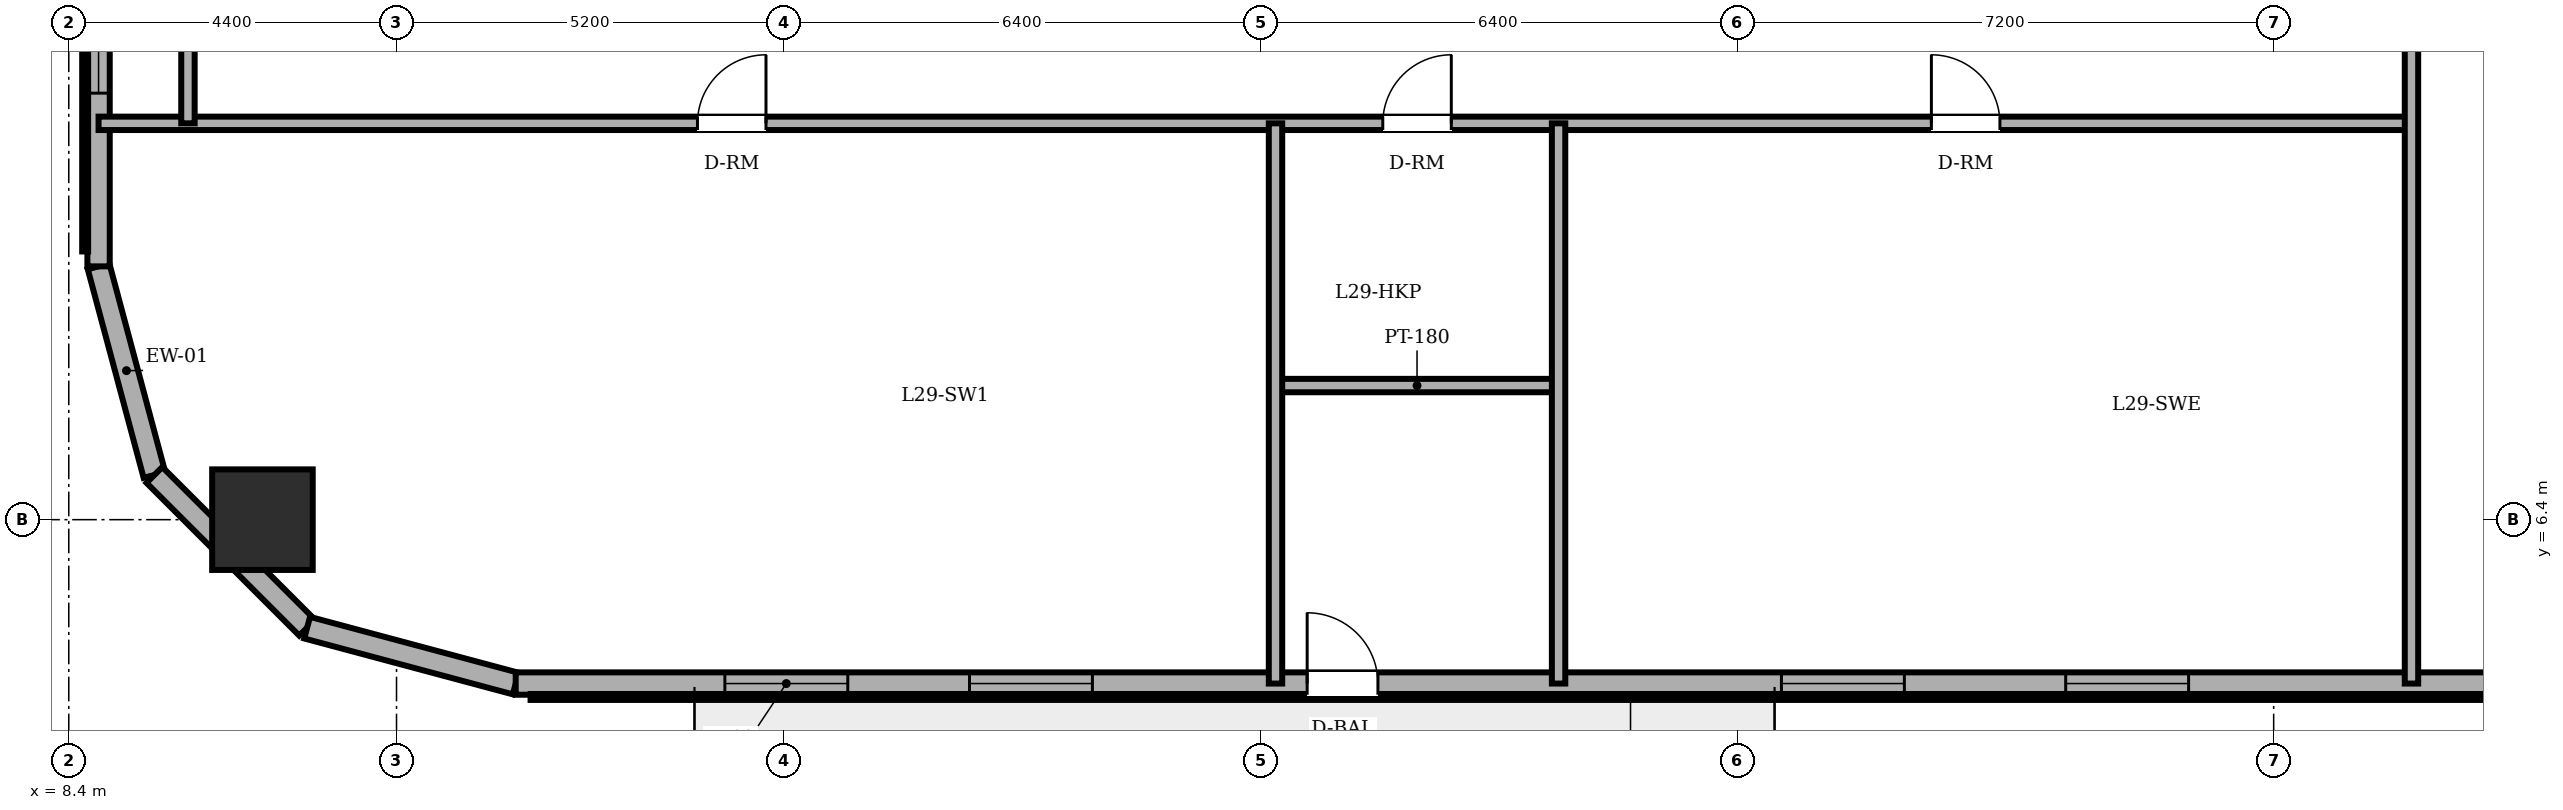
"""IFC4 building model, lengths in metres.
Left out: names, types, materials, properties, quantities, classifications, styles, units other than length and angle.
Written with IfcOpenShell. Run it as: python <this file> out.ifc"""

import sys

from ifc_helpers import new_model, si_unit, direction, frame, frame_2d, origin, origin_2d, place, context, subcontext, project, spatial, rectangle, circle, extrude, element, fill, save


model = new_model("IFC4")
c1 = context("Model", 3, precision=1e-05, world=origin(), true_north=direction((0.0, 1.0)))
c2 = subcontext(c1, "Body", "Model", "MODEL_VIEW")
j1 = project(units=[si_unit("LENGTHUNIT", "METRE"), si_unit("PLANEANGLEUNIT", "RADIAN")], contexts=[c1])
p1 = place(None, origin())
s1 = spatial("IfcSite", under=j1, at=p1, CompositionType="ELEMENT")
p2 = place(p1, origin())
s2 = spatial("IfcBuilding", under=s1, at=p2, CompositionType="ELEMENT")
p3 = place(p2, frame((0.0, 0.0, 111.5)))
s3 = spatial("IfcBuildingStorey", under=s2, at=p3, CompositionType="ELEMENT", Elevation=111.5)
p4 = place(p3, frame((11.0, 6.4, 0.0), z_axis=(0.0, 0.0, 1.0), x_axis=(1.0, 0.0, 0.0)))
e1 = element("IfcColumn", 1, at=p4, inside=s3, PredefinedType="COLUMN", context=c2, shape_type="SweptSolid", body=[
    extrude(circle(Radius=0.675, at=origin_2d()), origin(), (0.0, 0.0, 1.0), 3.6),
])
p5 = place(p3, frame((8.8, 9.8, 0.0), z_axis=(0.0, 0.0, 1.0), x_axis=(0.258731875344, -0.96594917914, 0.0)))
e2 = element("IfcWall", 2, at=p5, inside=s3, PredefinedType="SOLIDWALL", context=c2, shape_type="SweptSolid", body=[
    extrude(rectangle(XDim=2.899, YDim=0.3, at=frame_2d((1.449, 0.0))), origin(), (0.0, 0.0, 1.0), 3.4),
])
p6 = place(p3, frame((9.55, 7.0, 0.0), z_axis=(0.0, 0.0, 1.0), x_axis=(0.707106781187, -0.707106781187, 0.0)))
e3 = element("IfcWall", 3, at=p6, inside=s3, PredefinedType="SOLIDWALL", context=c2, shape_type="SweptSolid", body=[
    extrude(rectangle(XDim=2.899, YDim=0.3, at=frame_2d((1.45, 0.0))), origin(), (0.0, 0.0, 1.0), 3.4),
])
p7 = place(p3, frame((11.6, 4.95, 0.0), z_axis=(0.0, 0.0, 1.0), x_axis=(0.965943540406, -0.258752926066, 0.0)))
e4 = element("IfcWall", 4, at=p7, inside=s3, PredefinedType="SOLIDWALL", context=c2, shape_type="SweptSolid", body=[
    extrude(rectangle(XDim=2.898, YDim=0.3, at=frame_2d((1.449, 0.0))), origin(), (0.0, 0.0, 1.0), 3.4),
])
p8 = place(p3, frame((14.4, 4.2, 0.0), z_axis=(0.0, 0.0, 1.0), x_axis=(1.0, 0.0, 0.0)))
e5 = element("IfcWall", 5, at=p8, inside=s3, PredefinedType="SOLIDWALL", context=c2, shape_type="SweptSolid", body=[
    extrude(rectangle(XDim=29.933, YDim=0.3, at=frame_2d((14.967, 0.0))), origin(), (0.0, 0.0, 1.0), 3.4),
])
p9 = place(p8, frame((10.625, 0.0, 0.0)))
e6 = element("IfcOpeningElement", 6, at=p9, cuts=e5, PredefinedType="OPENING", context=c2, shape_type="SweptSolid", body=[
    extrude(rectangle(XDim=0.95, YDim=2.2, at=frame_2d((0.475, 1.1))), frame((0.0, 0.16, 0.0), z_axis=(0.0, -1.0, 0.0), x_axis=(1.0, 0.0, 0.0)), (0.0, 0.0, 1.0), 0.32),
])
p10 = place(p8, frame((2.808, 0.0, 0.85)))
e7 = element("IfcOpeningElement", 7, at=p10, cuts=e5, PredefinedType="OPENING", context=c2, shape_type="SweptSolid", body=[
    extrude(rectangle(XDim=1.65, YDim=1.55, at=frame_2d((0.825, 0.775))), frame((0.0, 0.16, 0.0), z_axis=(0.0, -1.0, 0.0), x_axis=(1.0, 0.0, 0.0)), (0.0, 0.0, 1.0), 0.32),
])
p11 = place(p8, frame((6.092, 0.0, 0.85)))
e8 = element("IfcOpeningElement", 8, at=p11, cuts=e5, PredefinedType="OPENING", context=c2, shape_type="SweptSolid", body=[
    extrude(rectangle(XDim=1.65, YDim=1.55, at=frame_2d((0.825, 0.775))), frame((0.0, 0.16, 0.0), z_axis=(0.0, -1.0, 0.0), x_axis=(1.0, 0.0, 0.0)), (0.0, 0.0, 1.0), 0.32),
])
p12 = place(p8, frame((16.992, 0.0, 0.85)))
e9 = element("IfcOpeningElement", 9, at=p12, cuts=e5, PredefinedType="OPENING", context=c2, shape_type="SweptSolid", body=[
    extrude(rectangle(XDim=1.65, YDim=1.55, at=frame_2d((0.825, 0.775))), frame((0.0, 0.16, 0.0), z_axis=(0.0, -1.0, 0.0), x_axis=(1.0, 0.0, 0.0)), (0.0, 0.0, 1.0), 0.32),
])
p13 = place(p8, frame((20.808, 0.0, 0.85)))
e10 = element("IfcOpeningElement", 10, at=p13, cuts=e5, PredefinedType="OPENING", context=c2, shape_type="SweptSolid", body=[
    extrude(rectangle(XDim=1.65, YDim=1.55, at=frame_2d((0.825, 0.775))), frame((0.0, 0.16, 0.0), z_axis=(0.0, -1.0, 0.0), x_axis=(1.0, 0.0, 0.0)), (0.0, 0.0, 1.0), 0.32),
])
p14 = place(p8, frame((26.692, 0.0, 0.85)))
e11 = element("IfcOpeningElement", 11, at=p14, cuts=e5, PredefinedType="OPENING", context=c2, shape_type="SweptSolid", body=[
    extrude(rectangle(XDim=1.65, YDim=1.55, at=frame_2d((0.825, 0.775))), frame((0.0, 0.16, 0.0), z_axis=(0.0, -1.0, 0.0), x_axis=(1.0, 0.0, 0.0)), (0.0, 0.0, 1.0), 0.32),
])
p15 = place(p3, frame((8.8, 38.2, 0.0), z_axis=(0.0, 0.0, 1.0), x_axis=(0.0, -1.0, 0.0)))
e12 = element("IfcWall", 12, at=p15, inside=s3, PredefinedType="SOLIDWALL", context=c2, shape_type="SweptSolid", body=[
    extrude(rectangle(XDim=28.4, YDim=0.3, at=frame_2d((14.2, 0.0))), origin(), (0.0, 0.0, 1.0), 3.4),
])
p16 = place(p15, frame((2.325, 0.0, 0.85)))
e13 = element("IfcOpeningElement", 13, at=p16, cuts=e12, PredefinedType="OPENING", context=c2, shape_type="SweptSolid", body=[
    extrude(rectangle(XDim=1.65, YDim=1.55, at=frame_2d((0.825, 0.775))), frame((0.0, 0.16, 0.0), z_axis=(0.0, -1.0, 0.0), x_axis=(1.0, 0.0, 0.0)), (0.0, 0.0, 1.0), 0.32),
])
p17 = place(p15, frame((6.828, 0.0, 0.85)))
e14 = element("IfcOpeningElement", 14, at=p17, cuts=e12, PredefinedType="OPENING", context=c2, shape_type="SweptSolid", body=[
    extrude(rectangle(XDim=1.65, YDim=1.55, at=frame_2d((0.825, 0.775))), frame((0.0, 0.16, 0.0), z_axis=(0.0, -1.0, 0.0), x_axis=(1.0, 0.0, 0.0)), (0.0, 0.0, 1.0), 0.32),
])
p18 = place(p15, frame((10.102, 0.0, 0.85)))
e15 = element("IfcOpeningElement", 15, at=p18, cuts=e12, PredefinedType="OPENING", context=c2, shape_type="SweptSolid", body=[
    extrude(rectangle(XDim=1.65, YDim=1.55, at=frame_2d((0.825, 0.775))), frame((0.0, 0.16, 0.0), z_axis=(0.0, -1.0, 0.0), x_axis=(1.0, 0.0, 0.0)), (0.0, 0.0, 1.0), 0.32),
])
p19 = place(p15, frame((16.648, 0.0, 0.85)))
e16 = element("IfcOpeningElement", 16, at=p19, cuts=e12, PredefinedType="OPENING", context=c2, shape_type="SweptSolid", body=[
    extrude(rectangle(XDim=1.65, YDim=1.55, at=frame_2d((0.825, 0.775))), frame((0.0, 0.16, 0.0), z_axis=(0.0, -1.0, 0.0), x_axis=(1.0, 0.0, 0.0)), (0.0, 0.0, 1.0), 0.32),
])
p20 = place(p15, frame((19.922, 0.0, 0.85)))
e17 = element("IfcOpeningElement", 17, at=p20, cuts=e12, PredefinedType="OPENING", context=c2, shape_type="SweptSolid", body=[
    extrude(rectangle(XDim=1.65, YDim=1.55, at=frame_2d((0.825, 0.775))), frame((0.0, 0.16, 0.0), z_axis=(0.0, -1.0, 0.0), x_axis=(1.0, 0.0, 0.0)), (0.0, 0.0, 1.0), 0.32),
])
p21 = place(p15, frame((24.425, 0.0, 0.85)))
e18 = element("IfcOpeningElement", 18, at=p21, cuts=e12, PredefinedType="OPENING", context=c2, shape_type="SweptSolid", body=[
    extrude(rectangle(XDim=1.65, YDim=1.55, at=frame_2d((0.825, 0.775))), frame((0.0, 0.16, 0.0), z_axis=(0.0, -1.0, 0.0), x_axis=(1.0, 0.0, 0.0)), (0.0, 0.0, 1.0), 0.32),
])
p22 = place(p3, frame((24.6, 8.2, 0.0), z_axis=(0.0, 0.0, 1.0), x_axis=(1.0, 0.0, 0.0)))
e19 = element("IfcWall", 19, at=p22, inside=s3, PredefinedType="PARTITIONING", context=c2, shape_type="SweptSolid", body=[
    extrude(rectangle(XDim=3.8, YDim=0.18, at=frame_2d((1.9, 0.0))), origin(), (0.0, 0.0, 1.0), 3.4),
])
p23 = place(p3, frame((8.8, 11.72, 0.0), z_axis=(0.0, 0.0, 1.0), x_axis=(1.0, 0.0, 0.0)))
e20 = element("IfcWall", 20, at=p23, inside=s3, PredefinedType="PARTITIONING", context=c2, shape_type="SweptSolid", body=[
    extrude(rectangle(XDim=31.05, YDim=0.18, at=frame_2d((15.525, 0.0))), origin(), (0.0, 0.0, 1.0), 3.4),
])
p24 = place(p23, frame((17.24, 0.0, 0.0)))
e21 = element("IfcOpeningElement", 21, at=p24, cuts=e20, PredefinedType="OPENING", context=c2, shape_type="SweptSolid", body=[
    extrude(rectangle(XDim=0.92, YDim=2.1, at=frame_2d((0.46, 1.05))), frame((0.0, 0.1, 0.0), z_axis=(0.0, -1.0, 0.0), x_axis=(1.0, 0.0, 0.0)), (0.0, 0.0, 1.0), 0.2),
])
p25 = place(p23, frame((8.04, 0.0, 0.0)))
e22 = element("IfcOpeningElement", 22, at=p25, cuts=e20, PredefinedType="OPENING", context=c2, shape_type="SweptSolid", body=[
    extrude(rectangle(XDim=0.92, YDim=2.1, at=frame_2d((0.46, 1.05))), frame((0.0, 0.1, 0.0), z_axis=(0.0, -1.0, 0.0), x_axis=(1.0, 0.0, 0.0)), (0.0, 0.0, 1.0), 0.2),
])
p26 = place(p23, frame((24.605, 0.0, 0.0)))
e23 = element("IfcOpeningElement", 23, at=p26, cuts=e20, PredefinedType="OPENING", context=c2, shape_type="SweptSolid", body=[
    extrude(rectangle(XDim=0.92, YDim=2.1, at=frame_2d((0.46, 1.05))), frame((0.0, 0.1, 0.0), z_axis=(0.0, -1.0, 0.0), x_axis=(1.0, 0.0, 0.0)), (0.0, 0.0, 1.0), 0.2),
])
p27 = place(p3, frame((10.0, 11.72, 0.0), z_axis=(0.0, 0.0, 1.0), x_axis=(0.0, 1.0, 0.0)))
e24 = element("IfcWall", 24, at=p27, inside=s3, PredefinedType="PARTITIONING", context=c2, shape_type="SweptSolid", body=[
    extrude(rectangle(XDim=2.46, YDim=0.18, at=frame_2d((1.23, 0.0))), origin(), (0.0, 0.0, 1.0), 3.4),
])
for number, where, z_axis, x_axis in (
    (25, (24.6, 4.2, 0.0), (0.0, 0.0, 1.0), (0.0, 1.0, 0.0)),
    (26, (28.4, 4.2, 0.0), (0.0, 0.0, 1.0), (0.0, 1.0, 0.0)),
):
    element("IfcWall", number, at=place(p3, frame(where, z_axis=z_axis, x_axis=x_axis)), inside=s3, PredefinedType="PARTITIONING", context=c2, shape_type="SweptSolid", body=[
        extrude(rectangle(XDim=7.52, YDim=0.18, at=frame_2d((3.76, 0.0))), origin(), (0.0, 0.0, 1.0), 3.4),
    ])
p28 = place(p3, frame((39.85, 4.2, 0.0), z_axis=(0.0, 0.0, 1.0), x_axis=(0.0, 1.0, 0.0)))
e27 = element("IfcWall", 27, at=p28, inside=s3, PredefinedType="PARTITIONING", context=c2, shape_type="SweptSolid", body=[
    extrude(rectangle(XDim=18.62, YDim=0.18, at=frame_2d((9.31, 0.0))), origin(), (0.0, 0.0, 1.0), 3.4),
])
p29 = place(p28, frame((12.35, 0.0, 0.0)))
e28 = element("IfcOpeningElement", 28, at=p29, cuts=e27, PredefinedType="OPENING", context=c2, shape_type="SweptSolid", body=[
    extrude(rectangle(XDim=0.92, YDim=2.1, at=frame_2d((0.46, 1.05))), frame((0.0, 0.1, 0.0), z_axis=(0.0, -1.0, 0.0), x_axis=(1.0, 0.0, 0.0)), (0.0, 0.0, 1.0), 0.2),
])
p30 = place(p9, origin())
e29 = element("IfcDoor", 29, at=p30, inside=s3, OperationType="SINGLE_SWING_LEFT", PredefinedType="DOOR", context=c2, shape_type="SweptSolid", body=[
    extrude(rectangle(XDim=0.95, YDim=2.2, at=frame_2d((0.475, 1.1))), frame((0.0, 0.025, 0.0), z_axis=(0.0, -1.0, 0.0), x_axis=(1.0, 0.0, 0.0)), (0.0, 0.0, 1.0), 0.05),
])
fill(e6, e29)
p31 = place(p10, origin())
e30 = element("IfcWindow", 30, at=p31, inside=s3, PartitioningType="DOUBLE_PANEL_VERTICAL", PredefinedType="WINDOW", context=c2, shape_type="SweptSolid", body=[
    extrude(rectangle(XDim=1.65, YDim=1.55, at=frame_2d((0.825, 0.775))), frame((0.0, 0.03, 0.0), z_axis=(0.0, -1.0, 0.0), x_axis=(1.0, 0.0, 0.0)), (0.0, 0.0, 1.0), 0.06),
])
fill(e7, e30)
p32 = place(p11, origin())
e31 = element("IfcWindow", 31, at=p32, inside=s3, PartitioningType="DOUBLE_PANEL_VERTICAL", PredefinedType="WINDOW", context=c2, shape_type="SweptSolid", body=[
    extrude(rectangle(XDim=1.65, YDim=1.55, at=frame_2d((0.825, 0.775))), frame((0.0, 0.03, 0.0), z_axis=(0.0, -1.0, 0.0), x_axis=(1.0, 0.0, 0.0)), (0.0, 0.0, 1.0), 0.06),
])
fill(e8, e31)
p33 = place(p12, origin())
e32 = element("IfcWindow", 32, at=p33, inside=s3, PartitioningType="DOUBLE_PANEL_VERTICAL", PredefinedType="WINDOW", context=c2, shape_type="SweptSolid", body=[
    extrude(rectangle(XDim=1.65, YDim=1.55, at=frame_2d((0.825, 0.775))), frame((0.0, 0.03, 0.0), z_axis=(0.0, -1.0, 0.0), x_axis=(1.0, 0.0, 0.0)), (0.0, 0.0, 1.0), 0.06),
])
fill(e9, e32)
p34 = place(p13, origin())
e33 = element("IfcWindow", 33, at=p34, inside=s3, PartitioningType="DOUBLE_PANEL_VERTICAL", PredefinedType="WINDOW", context=c2, shape_type="SweptSolid", body=[
    extrude(rectangle(XDim=1.65, YDim=1.55, at=frame_2d((0.825, 0.775))), frame((0.0, 0.03, 0.0), z_axis=(0.0, -1.0, 0.0), x_axis=(1.0, 0.0, 0.0)), (0.0, 0.0, 1.0), 0.06),
])
fill(e10, e33)
p35 = place(p21, origin())
e34 = element("IfcWindow", 34, at=p35, inside=s3, PartitioningType="DOUBLE_PANEL_VERTICAL", PredefinedType="WINDOW", context=c2, shape_type="SweptSolid", body=[
    extrude(rectangle(XDim=1.65, YDim=1.55, at=frame_2d((0.825, 0.775))), frame((0.0, 0.03, 0.0), z_axis=(0.0, -1.0, 0.0), x_axis=(1.0, 0.0, 0.0)), (0.0, 0.0, 1.0), 0.06),
])
fill(e18, e34)
p36 = place(p24, origin())
e35 = element("IfcDoor", 35, at=p36, inside=s3, OperationType="SINGLE_SWING_RIGHT", PredefinedType="DOOR", context=c2, shape_type="SweptSolid", body=[
    extrude(rectangle(XDim=0.92, YDim=2.1, at=frame_2d((0.46, 1.05))), frame((0.0, 0.025, 0.0), z_axis=(0.0, -1.0, 0.0), x_axis=(1.0, 0.0, 0.0)), (0.0, 0.0, 1.0), 0.05),
])
fill(e21, e35)
p37 = place(p25, origin())
e36 = element("IfcDoor", 36, at=p37, inside=s3, OperationType="SINGLE_SWING_RIGHT", PredefinedType="DOOR", context=c2, shape_type="SweptSolid", body=[
    extrude(rectangle(XDim=0.92, YDim=2.1, at=frame_2d((0.46, 1.05))), frame((0.0, 0.025, 0.0), z_axis=(0.0, -1.0, 0.0), x_axis=(1.0, 0.0, 0.0)), (0.0, 0.0, 1.0), 0.05),
])
fill(e22, e36)
p38 = place(p26, origin())
e37 = element("IfcDoor", 37, at=p38, inside=s3, OperationType="SINGLE_SWING_LEFT", PredefinedType="DOOR", context=c2, shape_type="SweptSolid", body=[
    extrude(rectangle(XDim=0.92, YDim=2.1, at=frame_2d((0.46, 1.05))), frame((0.0, 0.025, 0.0), z_axis=(0.0, -1.0, 0.0), x_axis=(1.0, 0.0, 0.0)), (0.0, 0.0, 1.0), 0.05),
])
fill(e23, e37)
save(model, sys.argv[1])
